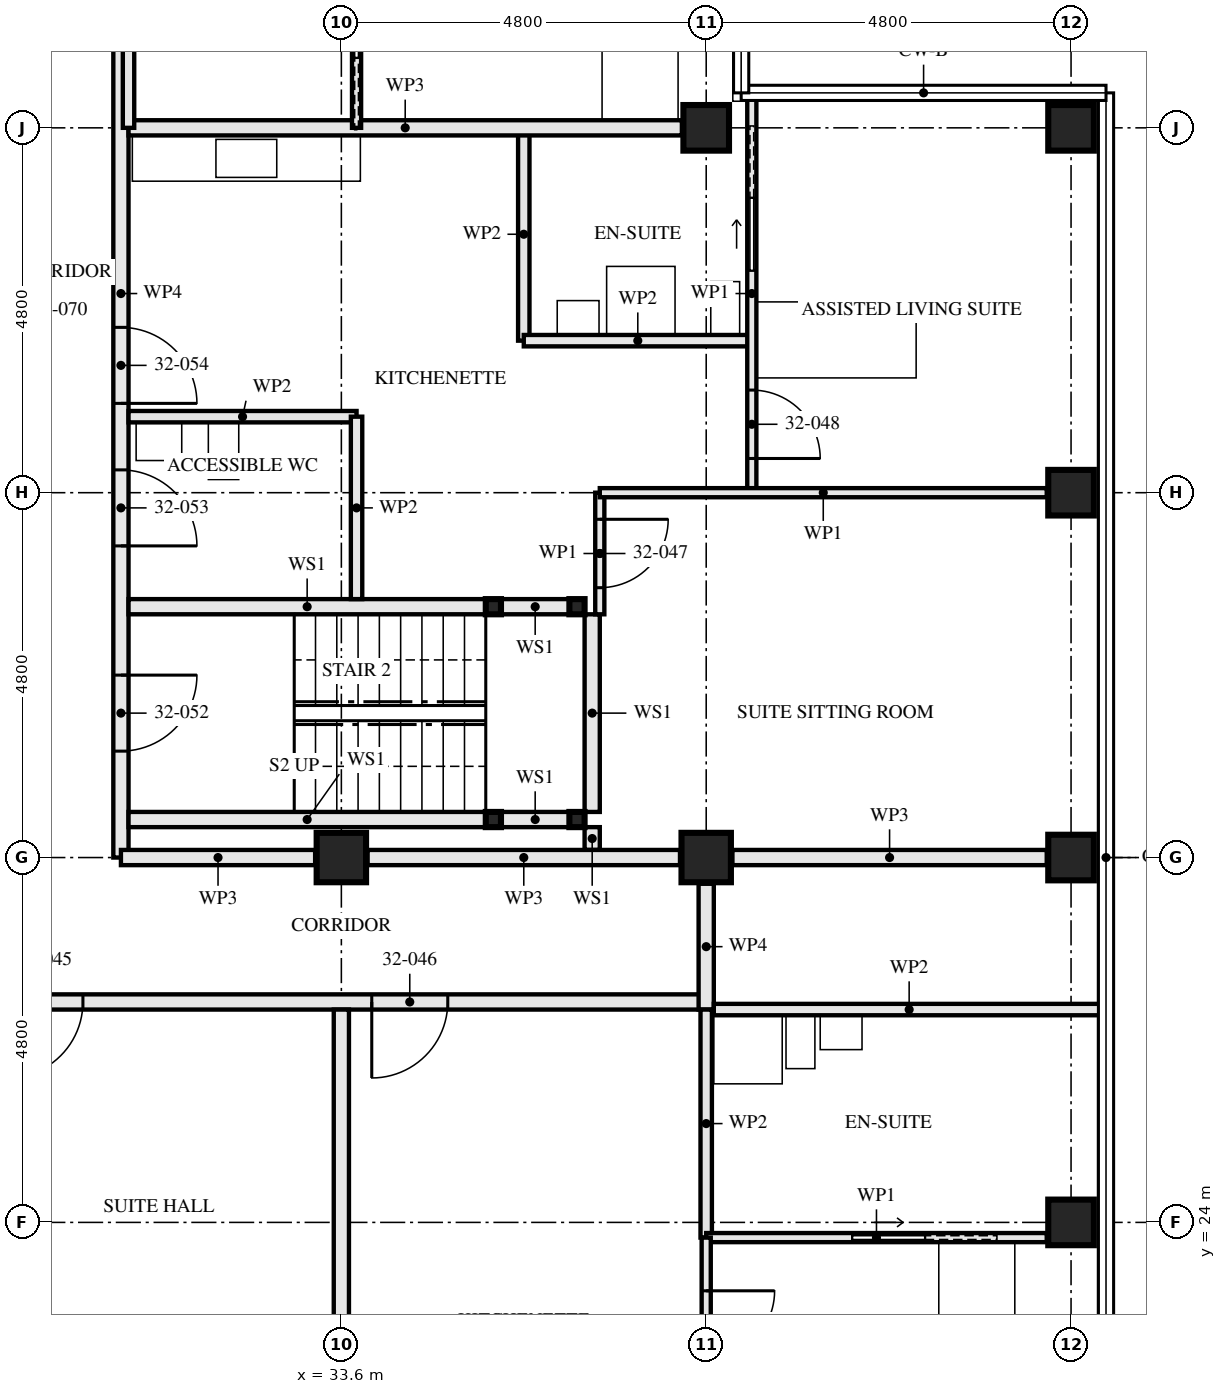
"""IFC4 building model, lengths in metres.
Left out: names, types, materials, properties, quantities, classifications, styles, units other than length and angle.
Written with IfcOpenShell. Run it as: python <this file> out.ifc"""

import sys

from ifc_helpers import new_model, si_unit, direction, frame, frame_2d, origin, origin_2d, place, context, subcontext, project, spatial, rectangle, hollow_rectangle, extrude, element, fill, save


model = new_model("IFC4")
c1 = context("Model", 3, precision=1e-05, world=origin(), true_north=direction((0.0, 1.0)))
c2 = subcontext(c1, "Body", "Model", "MODEL_VIEW")
j1 = project(units=[si_unit("LENGTHUNIT", "METRE"), si_unit("PLANEANGLEUNIT", "RADIAN")], contexts=[c1])
p1 = place(None, origin())
s1 = spatial("IfcSite", under=j1, at=p1, CompositionType="ELEMENT")
p2 = place(p1, origin())
s2 = spatial("IfcBuilding", under=s1, at=p2, CompositionType="ELEMENT")
p3 = place(p2, frame((0.0, 0.0, 119.0)))
s3 = spatial("IfcBuildingStorey", under=s2, at=p3, CompositionType="ELEMENT", Elevation=119.0)
for number, where, z_axis, x_axis in (
    (1, (33.6, 28.8, 0.0), (0.0, 0.0, 1.0), (0.0, 1.0, 0.0)),
    (2, (38.4, 28.8, 0.0), (0.0, 0.0, 1.0), (0.0, 1.0, 0.0)),
):
    element("IfcColumn", number, at=place(p3, frame(where, z_axis=z_axis, x_axis=x_axis)), inside=s3, PredefinedType="COLUMN", context=c2, shape_type="SweptSolid", body=[
        extrude(hollow_rectangle(XDim=0.65, YDim=0.65, WallThickness=0.05, at=origin_2d()), origin(), (0.0, 0.0, 1.0), 3.5),
    ])
for number, where, z_axis, x_axis in (
    (3, (38.4, 38.4, 0.0), (0.0, 0.0, 1.0), (0.0, 1.0, 0.0)),
    (4, (43.2, 24.0, 0.0), (0.0, 0.0, 1.0), (1.0, 0.0, 0.0)),
    (5, (43.2, 28.8, 0.0), (0.0, 0.0, 1.0), (0.0, 1.0, 0.0)),
    (6, (43.2, 33.6, 0.0), (0.0, 0.0, 1.0), (1.0, 0.0, 0.0)),
    (7, (43.2, 38.4, 0.0), (0.0, 0.0, 1.0), (0.0, 1.0, 0.0)),
):
    element("IfcColumn", number, at=place(p3, frame(where, z_axis=z_axis, x_axis=x_axis)), inside=s3, PredefinedType="COLUMN", context=c2, shape_type="SweptSolid", body=[
        extrude(hollow_rectangle(XDim=0.6, YDim=0.6, WallThickness=0.08, at=origin_2d()), origin(), (0.0, 0.0, 1.0), 3.5),
    ])
for number, where, z_axis, x_axis in (
    (8, (36.7, 29.3, 0.0), (0.0, 0.0, 1.0), (1.0, 0.0, 0.0)),
    (9, (36.7, 32.1, 0.0), (0.0, 0.0, 1.0), (1.0, 0.0, 0.0)),
    (10, (35.6, 29.3, 0.0), (0.0, 0.0, 1.0), (1.0, 0.0, 0.0)),
    (11, (35.6, 32.1, 0.0), (0.0, 0.0, 1.0), (1.0, 0.0, 0.0)),
):
    element("IfcColumn", number, at=place(p3, frame(where, z_axis=z_axis, x_axis=x_axis)), inside=s3, PredefinedType="COLUMN", context=c2, shape_type="SweptSolid", body=[
        extrude(hollow_rectangle(XDim=0.2, YDim=0.2, WallThickness=0.008, at=origin_2d()), origin(), (0.0, 0.0, 1.0), 3.33),
    ])
p4 = place(p3, frame((33.6, 14.72, 0.0), z_axis=(0.0, 0.0, 1.0), x_axis=(0.0, 1.0, 0.0)))
e12 = element("IfcWall", 12, at=p4, inside=s3, PredefinedType="PARTITIONING", context=c2, shape_type="SweptSolid", body=[
    extrude(rectangle(XDim=12.08, YDim=0.2, at=frame_2d((6.04, 0.0))), origin(), (0.0, 0.0, 1.0), 2.55),
])
p5 = place(p3, frame((38.4, 23.8, 0.0), z_axis=(0.0, 0.0, 1.0), x_axis=(0.0, 1.0, 0.0)))
e13 = element("IfcWall", 13, at=p5, inside=s3, PredefinedType="PARTITIONING", context=c2, shape_type="SweptSolid", body=[
    extrude(rectangle(XDim=3.0, YDim=0.15, at=frame_2d((1.5, 0.0))), origin(), (0.0, 0.0, 1.0), 2.55),
])
p6 = place(p3, frame((38.4, 23.8, 0.0), z_axis=(0.0, 0.0, 1.0), x_axis=(1.0, 0.0, 0.0)))
e14 = element("IfcWall", 14, at=p6, inside=s3, PredefinedType="PARTITIONING", context=c2, shape_type="SweptSolid", body=[
    extrude(rectangle(XDim=4.48, YDim=0.12, at=frame_2d((2.24, 0.0))), origin(), (0.0, 0.0, 1.0), 3.33),
])
p7 = place(p6, frame((1.925, 0.0, 0.0)))
e15 = element("IfcOpeningElement", 15, at=p7, cuts=e14, PredefinedType="OPENING", context=c2, shape_type="SweptSolid", body=[
    extrude(rectangle(XDim=0.95, YDim=2.1, at=frame_2d((0.475, 1.05))), frame((0.0, 0.071, 0.0), z_axis=(0.0, -1.0, 0.0), x_axis=(1.0, 0.0, 0.0)), (0.0, 0.0, 1.0), 0.141),
])
p8 = place(p3, frame((38.4, 19.52, 0.0), z_axis=(0.0, 0.0, 1.0), x_axis=(0.0, 1.0, 0.0)))
e16 = element("IfcWall", 16, at=p8, inside=s3, PredefinedType="PARTITIONING", context=c2, shape_type="SweptSolid", body=[
    extrude(rectangle(XDim=4.28, YDim=0.12, at=frame_2d((2.14, 0.0))), origin(), (0.0, 0.0, 1.0), 3.33),
])
p9 = place(p8, frame((2.68, 0.0, 0.0)))
e17 = element("IfcOpeningElement", 17, at=p9, cuts=e16, PredefinedType="OPENING", context=c2, shape_type="SweptSolid", body=[
    extrude(rectangle(XDim=0.9, YDim=2.1, at=frame_2d((0.45, 1.05))), frame((0.0, 0.071, 0.0), z_axis=(0.0, -1.0, 0.0), x_axis=(1.0, 0.0, 0.0)), (0.0, 0.0, 1.0), 0.141),
])
p10 = place(p3, frame((28.8, 26.9, 0.0), z_axis=(0.0, 0.0, 1.0), x_axis=(1.0, 0.0, 0.0)))
e18 = element("IfcWall", 18, at=p10, inside=s3, PredefinedType="PARTITIONING", context=c2, shape_type="SweptSolid", body=[
    extrude(rectangle(XDim=9.6, YDim=0.2, at=frame_2d((4.8, 0.0))), origin(), (0.0, 0.0, 1.0), 3.33),
])
p11 = place(p10, frame((0.4, 0.0, 0.0)))
e19 = element("IfcOpeningElement", 19, at=p11, cuts=e18, PredefinedType="OPENING", context=c2, shape_type="SweptSolid", body=[
    extrude(rectangle(XDim=1.0, YDim=2.1, at=frame_2d((0.5, 1.05))), frame((0.0, 0.111, 0.0), z_axis=(0.0, -1.0, 0.0), x_axis=(1.0, 0.0, 0.0)), (0.0, 0.0, 1.0), 0.221),
])
p12 = place(p10, frame((5.2, 0.0, 0.0)))
e20 = element("IfcOpeningElement", 20, at=p12, cuts=e18, PredefinedType="OPENING", context=c2, shape_type="SweptSolid", body=[
    extrude(rectangle(XDim=1.0, YDim=2.1, at=frame_2d((0.5, 1.05))), frame((0.0, 0.111, 0.0), z_axis=(0.0, -1.0, 0.0), x_axis=(1.0, 0.0, 0.0)), (0.0, 0.0, 1.0), 0.221),
])
p13 = place(p3, frame((38.4, 26.8, 0.0), z_axis=(0.0, 0.0, 1.0), x_axis=(0.0, 1.0, 0.0)))
e21 = element("IfcWall", 21, at=p13, inside=s3, PredefinedType="PARTITIONING", context=c2, shape_type="SweptSolid", body=[
    extrude(rectangle(XDim=1.655, YDim=0.2, at=frame_2d((0.828, 0.0))), origin(), (0.0, 0.0, 1.0), 3.33),
])
p14 = place(p3, frame((36.6, 29.3, 0.0), z_axis=(0.0, 0.0, 1.0), x_axis=(-1.0, 0.0, 0.0)))
e22 = element("IfcWall", 22, at=p14, inside=s3, PredefinedType="SOLIDWALL", context=c2, shape_type="SweptSolid", body=[
    extrude(rectangle(XDim=0.9, YDim=0.2, at=frame_2d((0.45, 0.0))), origin(), (0.0, 0.0, 1.0), 2.99),
])
p15 = place(p3, frame((35.5, 29.3, 0.0), z_axis=(0.0, 0.0, 1.0), x_axis=(-1.0, 0.0, 0.0)))
e23 = element("IfcWall", 23, at=p15, inside=s3, PredefinedType="SOLIDWALL", context=c2, shape_type="SweptSolid", body=[
    extrude(rectangle(XDim=4.7, YDim=0.2, at=frame_2d((2.35, 0.0))), origin(), (0.0, 0.0, 1.0), 2.99),
])
p16 = place(p3, frame((36.6, 32.1, 0.0), z_axis=(0.0, 0.0, 1.0), x_axis=(-1.0, 0.0, 0.0)))
e24 = element("IfcWall", 24, at=p16, inside=s3, PredefinedType="SOLIDWALL", context=c2, shape_type="SweptSolid", body=[
    extrude(rectangle(XDim=0.9, YDim=0.2, at=frame_2d((0.45, 0.0))), origin(), (0.0, 0.0, 1.0), 2.99),
])
p17 = place(p3, frame((35.5, 32.1, 0.0), z_axis=(0.0, 0.0, 1.0), x_axis=(-1.0, 0.0, 0.0)))
e25 = element("IfcWall", 25, at=p17, inside=s3, PredefinedType="SOLIDWALL", context=c2, shape_type="SweptSolid", body=[
    extrude(rectangle(XDim=4.7, YDim=0.2, at=frame_2d((2.35, 0.0))), origin(), (0.0, 0.0, 1.0), 2.99),
])
p18 = place(p3, frame((36.9, 28.9, 0.0), z_axis=(0.0, 0.0, 1.0), x_axis=(0.0, 1.0, 0.0)))
e26 = element("IfcWall", 26, at=p18, inside=s3, PredefinedType="SOLIDWALL", context=c2, shape_type="SweptSolid", body=[
    extrude(rectangle(XDim=0.3, YDim=0.2, at=frame_2d((0.15, 0.0))), origin(), (0.0, 0.0, 1.0), 3.33),
])
p19 = place(p3, frame((36.9, 29.4, 0.0), z_axis=(0.0, 0.0, 1.0), x_axis=(0.0, 1.0, 0.0)))
e27 = element("IfcWall", 27, at=p19, inside=s3, PredefinedType="SOLIDWALL", context=c2, shape_type="SweptSolid", body=[
    extrude(rectangle(XDim=2.6, YDim=0.2, at=frame_2d((1.3, 0.0))), origin(), (0.0, 0.0, 1.0), 3.33),
])
p20 = place(p3, frame((33.8, 32.2, 0.0), z_axis=(0.0, 0.0, 1.0), x_axis=(0.0, 1.0, 0.0)))
e28 = element("IfcWall", 28, at=p20, inside=s3, PredefinedType="PARTITIONING", context=c2, shape_type="SweptSolid", body=[
    extrude(rectangle(XDim=2.4, YDim=0.15, at=frame_2d((1.2, 0.0))), origin(), (0.0, 0.0, 1.0), 2.55),
])
for number, where, z_axis, x_axis in (
    (29, (33.8, 34.6, 0.0), (0.0, 0.0, 1.0), (-1.0, 0.0, 0.0)),
    (30, (39.0, 35.6, 0.0), (0.0, 0.0, 1.0), (-1.0, 0.0, 0.0)),
):
    element("IfcWall", number, at=place(p3, frame(where, z_axis=z_axis, x_axis=x_axis)), inside=s3, PredefinedType="PARTITIONING", context=c2, shape_type="SweptSolid", body=[
        extrude(rectangle(XDim=3.0, YDim=0.15, at=frame_2d((1.5, 0.0))), origin(), (0.0, 0.0, 1.0), 3.33),
    ])
p21 = place(p3, frame((36.0, 35.6, 0.0), z_axis=(0.0, 0.0, 1.0), x_axis=(0.0, 1.0, 0.0)))
e31 = element("IfcWall", 31, at=p21, inside=s3, PredefinedType="PARTITIONING", context=c2, shape_type="SweptSolid", body=[
    extrude(rectangle(XDim=2.8, YDim=0.15, at=frame_2d((1.4, 0.0))), origin(), (0.0, 0.0, 1.0), 3.33),
])
p22 = place(p3, frame((37.0, 32.0, 0.0), z_axis=(0.0, 0.0, 1.0), x_axis=(0.0, 1.0, 0.0)))
e32 = element("IfcWall", 32, at=p22, inside=s3, PredefinedType="PARTITIONING", context=c2, shape_type="SweptSolid", body=[
    extrude(rectangle(XDim=1.6, YDim=0.12, at=frame_2d((0.8, 0.0))), origin(), (0.0, 0.0, 1.0), 3.33),
])
p23 = place(p22, frame((0.35, 0.0, 0.0)))
e33 = element("IfcOpeningElement", 33, at=p23, cuts=e32, PredefinedType="OPENING", context=c2, shape_type="SweptSolid", body=[
    extrude(rectangle(XDim=0.9, YDim=2.1, at=frame_2d((0.45, 1.05))), frame((0.0, 0.071, 0.0), z_axis=(0.0, -1.0, 0.0), x_axis=(1.0, 0.0, 0.0)), (0.0, 0.0, 1.0), 0.141),
])
p24 = place(p3, frame((39.0, 33.6, 0.0), z_axis=(0.0, 0.0, 1.0), x_axis=(0.0, 1.0, 0.0)))
e34 = element("IfcWall", 34, at=p24, inside=s3, PredefinedType="PARTITIONING", context=c2, shape_type="SweptSolid", body=[
    extrude(rectangle(XDim=5.24, YDim=0.12, at=frame_2d((2.62, 0.0))), origin(), (0.0, 0.0, 1.0), 2.32),
])
p25 = place(p24, frame((0.45, 0.0, 0.0)))
e35 = element("IfcOpeningElement", 35, at=p25, cuts=e34, PredefinedType="OPENING", context=c2, shape_type="SweptSolid", body=[
    extrude(rectangle(XDim=0.9, YDim=2.1, at=frame_2d((0.45, 1.05))), frame((0.0, 0.071, 0.0), z_axis=(0.0, -1.0, 0.0), x_axis=(1.0, 0.0, 0.0)), (0.0, 0.0, 1.0), 0.141),
])
p26 = place(p24, frame((2.925, 0.0, 0.0)))
e36 = element("IfcOpeningElement", 36, at=p26, cuts=e34, PredefinedType="OPENING", context=c2, shape_type="SweptSolid", body=[
    extrude(rectangle(XDim=0.95, YDim=2.1, at=frame_2d((0.475, 1.05))), frame((0.0, 0.071, 0.0), z_axis=(0.0, -1.0, 0.0), x_axis=(1.0, 0.0, 0.0)), (0.0, 0.0, 1.0), 0.141),
])
p27 = place(p3, frame((42.88, 33.6, 0.0), z_axis=(0.0, 0.0, 1.0), x_axis=(-1.0, 0.0, 0.0)))
e37 = element("IfcWall", 37, at=p27, inside=s3, PredefinedType="PARTITIONING", context=c2, shape_type="SweptSolid", body=[
    extrude(rectangle(XDim=5.88, YDim=0.12, at=frame_2d((2.94, 0.0))), origin(), (0.0, 0.0, 1.0), 2.55),
])
p28 = place(p3, frame((38.08, 38.4, 0.0), z_axis=(0.0, 0.0, 1.0), x_axis=(-1.0, 0.0, 0.0)))
e38 = element("IfcWall", 38, at=p28, inside=s3, PredefinedType="PARTITIONING", context=c2, shape_type="SweptSolid", body=[
    extrude(rectangle(XDim=7.28, YDim=0.2, at=frame_2d((3.64, 0.0))), origin(), (0.0, 0.0, 1.0), 2.55),
])
p29 = place(p3, frame((30.8, 38.4, 0.0), z_axis=(0.0, 0.0, 1.0), x_axis=(0.0, 1.0, 0.0)))
e39 = element("IfcWall", 39, at=p29, inside=s3, PredefinedType="PARTITIONING", context=c2, shape_type="SweptSolid", body=[
    extrude(rectangle(XDim=2.8, YDim=0.15, at=frame_2d((1.4, 0.0))), origin(), (0.0, 0.0, 1.0), 3.33),
])
p30 = place(p3, frame((33.8, 38.4, 0.0), z_axis=(0.0, 0.0, 1.0), x_axis=(0.0, 1.0, 0.0)))
e40 = element("IfcWall", 40, at=p30, inside=s3, PredefinedType="PARTITIONING", context=c2, shape_type="SweptSolid", body=[
    extrude(rectangle(XDim=4.48, YDim=0.12, at=frame_2d((2.24, 0.0))), origin(), (0.0, 0.0, 1.0), 3.33),
])
p31 = place(p30, frame((2.975, 0.0, 0.0)))
e41 = element("IfcOpeningElement", 41, at=p31, cuts=e40, PredefinedType="OPENING", context=c2, shape_type="SweptSolid", body=[
    extrude(rectangle(XDim=0.9, YDim=2.1, at=frame_2d((0.45, 1.05))), frame((0.0, 0.071, 0.0), z_axis=(0.0, -1.0, 0.0), x_axis=(1.0, 0.0, 0.0)), (0.0, 0.0, 1.0), 0.141),
])
p32 = place(p30, frame((0.925, 0.0, 0.0)))
e42 = element("IfcOpeningElement", 42, at=p32, cuts=e40, PredefinedType="OPENING", context=c2, shape_type="SweptSolid", body=[
    extrude(rectangle(XDim=0.95, YDim=2.1, at=frame_2d((0.475, 1.05))), frame((0.0, 0.071, 0.0), z_axis=(0.0, -1.0, 0.0), x_axis=(1.0, 0.0, 0.0)), (0.0, 0.0, 1.0), 0.141),
])
p33 = place(p3, frame((30.7, 28.8, 0.0), z_axis=(0.0, 0.0, 1.0), x_axis=(0.0, 1.0, 0.0)))
e43 = element("IfcWall", 43, at=p33, inside=s3, PredefinedType="PARTITIONING", context=c2, shape_type="SweptSolid", body=[
    extrude(rectangle(XDim=14.84, YDim=0.2, at=frame_2d((7.42, 0.0))), origin(), (0.0, 0.0, 1.0), 2.32),
])
p34 = place(p33, frame((1.4, 0.0, 0.0)))
e44 = element("IfcOpeningElement", 44, at=p34, cuts=e43, PredefinedType="OPENING", context=c2, shape_type="SweptSolid", body=[
    extrude(rectangle(XDim=1.0, YDim=2.1, at=frame_2d((0.5, 1.05))), frame((0.0, 0.111, 0.0), z_axis=(0.0, -1.0, 0.0), x_axis=(1.0, 0.0, 0.0)), (0.0, 0.0, 1.0), 0.221),
])
p35 = place(p33, frame((4.1, 0.0, 0.0)))
e45 = element("IfcOpeningElement", 45, at=p35, cuts=e43, PredefinedType="OPENING", context=c2, shape_type="SweptSolid", body=[
    extrude(rectangle(XDim=1.0, YDim=2.1, at=frame_2d((0.5, 1.05))), frame((0.0, 0.111, 0.0), z_axis=(0.0, -1.0, 0.0), x_axis=(1.0, 0.0, 0.0)), (0.0, 0.0, 1.0), 0.221),
])
p36 = place(p33, frame((5.975, 0.0, 0.0)))
e46 = element("IfcOpeningElement", 46, at=p36, cuts=e43, PredefinedType="OPENING", context=c2, shape_type="SweptSolid", body=[
    extrude(rectangle(XDim=1.0, YDim=2.1, at=frame_2d((0.5, 1.05))), frame((0.0, 0.111, 0.0), z_axis=(0.0, -1.0, 0.0), x_axis=(1.0, 0.0, 0.0)), (0.0, 0.0, 1.0), 0.221),
])
p37 = place(p33, frame((13.0, 0.0, 0.0)))
e47 = element("IfcOpeningElement", 47, at=p37, cuts=e43, PredefinedType="OPENING", context=c2, shape_type="SweptSolid", body=[
    extrude(rectangle(XDim=1.0, YDim=2.1, at=frame_2d((0.5, 1.05))), frame((0.0, 0.111, 0.0), z_axis=(0.0, -1.0, 0.0), x_axis=(1.0, 0.0, 0.0)), (0.0, 0.0, 1.0), 0.221),
])
p38 = place(p3, frame((42.88, 28.8, 0.0), z_axis=(0.0, 0.0, 1.0), x_axis=(-1.0, 0.0, 0.0)))
e48 = element("IfcWall", 48, at=p38, inside=s3, PredefinedType="PARTITIONING", context=c2, shape_type="SweptSolid", body=[
    extrude(rectangle(XDim=4.135, YDim=0.2, at=frame_2d((2.067, 0.0))), origin(), (0.0, 0.0, 1.0), 2.32),
])
p39 = place(p3, frame((38.055, 28.8, 0.0), z_axis=(0.0, 0.0, 1.0), x_axis=(-1.0, 0.0, 0.0)))
e49 = element("IfcWall", 49, at=p39, inside=s3, PredefinedType="PARTITIONING", context=c2, shape_type="SweptSolid", body=[
    extrude(rectangle(XDim=4.11, YDim=0.2, at=frame_2d((2.055, 0.0))), origin(), (0.0, 0.0, 1.0), 2.32),
])
p40 = place(p3, frame((33.255, 28.8, 0.0), z_axis=(0.0, 0.0, 1.0), x_axis=(-1.0, 0.0, 0.0)))
e50 = element("IfcWall", 50, at=p40, inside=s3, PredefinedType="PARTITIONING", context=c2, shape_type="SweptSolid", body=[
    extrude(rectangle(XDim=2.555, YDim=0.2, at=frame_2d((1.277, 0.0))), origin(), (0.0, 0.0, 1.0), 2.32),
])
p41 = place(p3, frame((38.5, 26.8, 0.0), z_axis=(0.0, 0.0, 1.0), x_axis=(1.0, 0.0, 0.0)))
e51 = element("IfcWall", 51, at=p41, inside=s3, PredefinedType="PARTITIONING", context=c2, shape_type="SweptSolid", body=[
    extrude(rectangle(XDim=5.14, YDim=0.15, at=frame_2d((2.57, 0.0))), origin(), (0.0, 0.0, 1.0), 2.32),
])
p42 = place(p7, origin())
e52 = element("IfcDoor", 52, at=p42, inside=s3, OperationType="SLIDING_TO_LEFT", PredefinedType="DOOR", context=c2, shape_type="SweptSolid", body=[
    extrude(rectangle(XDim=0.95, YDim=2.1, at=frame_2d((0.475, 1.05))), frame((0.0, 0.022, 0.0), z_axis=(0.0, -1.0, 0.0), x_axis=(1.0, 0.0, 0.0)), (0.0, 0.0, 1.0), 0.044),
])
fill(e15, e52)
p43 = place(p9, frame((0.9, 0.0, 0.0), z_axis=(0.0, 0.0, 1.0), x_axis=(-1.0, 0.0, 0.0)))
e53 = element("IfcDoor", 53, at=p43, inside=s3, OperationType="SINGLE_SWING_RIGHT", PredefinedType="DOOR", context=c2, shape_type="SweptSolid", body=[
    extrude(rectangle(XDim=0.9, YDim=2.1, at=frame_2d((0.45, 1.05))), frame((0.0, 0.022, 0.0), z_axis=(0.0, -1.0, 0.0), x_axis=(1.0, 0.0, 0.0)), (0.0, 0.0, 1.0), 0.044),
])
fill(e17, e53)
p44 = place(p11, frame((1.0, 0.0, 0.0), z_axis=(0.0, 0.0, 1.0), x_axis=(-1.0, 0.0, 0.0)))
e54 = element("IfcDoor", 54, at=p44, inside=s3, OperationType="SINGLE_SWING_LEFT", PredefinedType="DOOR", context=c2, shape_type="SweptSolid", body=[
    extrude(rectangle(XDim=1.0, YDim=2.1, at=frame_2d((0.5, 1.05))), frame((0.0, 0.027, 0.0), z_axis=(0.0, -1.0, 0.0), x_axis=(1.0, 0.0, 0.0)), (0.0, 0.0, 1.0), 0.054),
])
fill(e19, e54)
p45 = place(p12, frame((1.0, 0.0, 0.0), z_axis=(0.0, 0.0, 1.0), x_axis=(-1.0, 0.0, 0.0)))
e55 = element("IfcDoor", 55, at=p45, inside=s3, OperationType="SINGLE_SWING_LEFT", PredefinedType="DOOR", context=c2, shape_type="SweptSolid", body=[
    extrude(rectangle(XDim=1.0, YDim=2.1, at=frame_2d((0.5, 1.05))), frame((0.0, 0.027, 0.0), z_axis=(0.0, -1.0, 0.0), x_axis=(1.0, 0.0, 0.0)), (0.0, 0.0, 1.0), 0.054),
])
fill(e20, e55)
p46 = place(p23, frame((0.9, 0.0, 0.0), z_axis=(0.0, 0.0, 1.0), x_axis=(-1.0, 0.0, 0.0)))
e56 = element("IfcDoor", 56, at=p46, inside=s3, OperationType="SINGLE_SWING_RIGHT", PredefinedType="DOOR", context=c2, shape_type="SweptSolid", body=[
    extrude(rectangle(XDim=0.9, YDim=2.1, at=frame_2d((0.45, 1.05))), frame((0.0, 0.022, 0.0), z_axis=(0.0, -1.0, 0.0), x_axis=(1.0, 0.0, 0.0)), (0.0, 0.0, 1.0), 0.044),
])
fill(e33, e56)
p47 = place(p25, frame((0.9, 0.0, 0.0), z_axis=(0.0, 0.0, 1.0), x_axis=(-1.0, 0.0, 0.0)))
e57 = element("IfcDoor", 57, at=p47, inside=s3, OperationType="SINGLE_SWING_LEFT", PredefinedType="DOOR", context=c2, shape_type="SweptSolid", body=[
    extrude(rectangle(XDim=0.9, YDim=2.1, at=frame_2d((0.45, 1.05))), frame((0.0, 0.022, 0.0), z_axis=(0.0, -1.0, 0.0), x_axis=(1.0, 0.0, 0.0)), (0.0, 0.0, 1.0), 0.044),
])
fill(e35, e57)
p48 = place(p26, origin())
e58 = element("IfcDoor", 58, at=p48, inside=s3, OperationType="SLIDING_TO_LEFT", PredefinedType="DOOR", context=c2, shape_type="SweptSolid", body=[
    extrude(rectangle(XDim=0.95, YDim=2.1, at=frame_2d((0.475, 1.05))), frame((0.0, 0.022, 0.0), z_axis=(0.0, -1.0, 0.0), x_axis=(1.0, 0.0, 0.0)), (0.0, 0.0, 1.0), 0.044),
])
fill(e36, e58)
p49 = place(p32, origin())
e59 = element("IfcDoor", 59, at=p49, inside=s3, OperationType="SLIDING_TO_RIGHT", PredefinedType="DOOR", context=c2, shape_type="SweptSolid", body=[
    extrude(rectangle(XDim=0.95, YDim=2.1, at=frame_2d((0.475, 1.05))), frame((0.0, 0.022, 0.0), z_axis=(0.0, -1.0, 0.0), x_axis=(1.0, 0.0, 0.0)), (0.0, 0.0, 1.0), 0.044),
])
fill(e42, e59)
p50 = place(p34, frame((1.0, 0.0, 0.0), z_axis=(0.0, 0.0, 1.0), x_axis=(-1.0, 0.0, 0.0)))
e60 = element("IfcDoor", 60, at=p50, inside=s3, OperationType="SINGLE_SWING_RIGHT", PredefinedType="DOOR", context=c2, shape_type="SweptSolid", body=[
    extrude(rectangle(XDim=1.0, YDim=2.1, at=frame_2d((0.5, 1.05))), frame((0.0, 0.032, 0.0), z_axis=(0.0, -1.0, 0.0), x_axis=(1.0, 0.0, 0.0)), (0.0, 0.0, 1.0), 0.064),
])
fill(e44, e60)
p51 = place(p35, frame((1.0, 0.0, 0.0), z_axis=(0.0, 0.0, 1.0), x_axis=(-1.0, 0.0, 0.0)))
e61 = element("IfcDoor", 61, at=p51, inside=s3, OperationType="SINGLE_SWING_LEFT", PredefinedType="DOOR", context=c2, shape_type="SweptSolid", body=[
    extrude(rectangle(XDim=1.0, YDim=2.1, at=frame_2d((0.5, 1.05))), frame((0.0, 0.027, 0.0), z_axis=(0.0, -1.0, 0.0), x_axis=(1.0, 0.0, 0.0)), (0.0, 0.0, 1.0), 0.054),
])
fill(e45, e61)
p52 = place(p36, frame((1.0, 0.0, 0.0), z_axis=(0.0, 0.0, 1.0), x_axis=(-1.0, 0.0, 0.0)))
e62 = element("IfcDoor", 62, at=p52, inside=s3, OperationType="SINGLE_SWING_LEFT", PredefinedType="DOOR", context=c2, shape_type="SweptSolid", body=[
    extrude(rectangle(XDim=1.0, YDim=2.1, at=frame_2d((0.5, 1.05))), frame((0.0, 0.027, 0.0), z_axis=(0.0, -1.0, 0.0), x_axis=(1.0, 0.0, 0.0)), (0.0, 0.0, 1.0), 0.054),
])
fill(e46, e62)
save(model, sys.argv[1])
